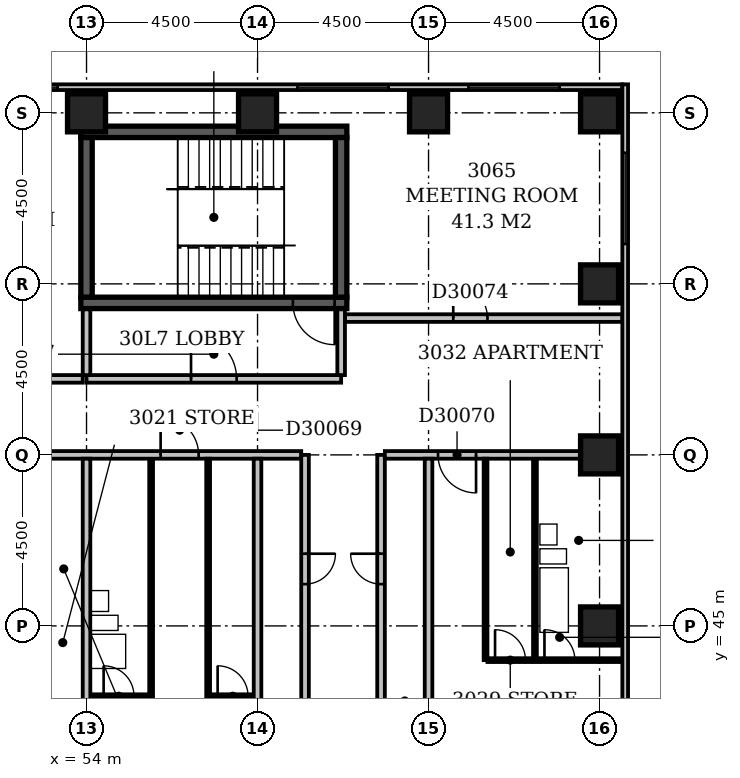
"""IFC4 building model, lengths in metres.
Left out: names, types, materials, properties, quantities, classifications, styles, units other than length and angle.
Written with IfcOpenShell. Run it as: python <this file> out.ifc"""

import sys

from ifc_helpers import new_model, si_unit, direction, frame, frame_2d, origin, origin_2d, place, context, subcontext, project, spatial, rectangle, extrude, element, fill, save


model = new_model("IFC4")
c1 = context("Model", 3, precision=1e-05, world=origin(), true_north=direction((0.0, 1.0)))
c2 = subcontext(c1, "Body", "Model", "MODEL_VIEW")
j1 = project(units=[si_unit("LENGTHUNIT", "METRE"), si_unit("PLANEANGLEUNIT", "RADIAN")], contexts=[c1])
p1 = place(None, origin())
s1 = spatial("IfcSite", under=j1, at=p1, CompositionType="ELEMENT")
p2 = place(p1, origin())
s2 = spatial("IfcBuilding", under=s1, at=p2, CompositionType="ELEMENT")
p3 = place(p2, frame((0.0, 0.0, 123.2)))
s3 = spatial("IfcBuildingStorey", under=s2, at=p3, CompositionType="ELEMENT", Elevation=123.2)
p4 = place(p3, frame((53.85, 53.5, -0.3), z_axis=(0.0, 0.0, 1.0), x_axis=(1.0, 0.0, 0.0)))
e1 = element("IfcWall", 1, at=p4, inside=s3, PredefinedType="SHEAR", context=c2, shape_type="SweptSolid", body=[
    extrude(rectangle(XDim=7.0, YDim=0.3, at=frame_2d((3.5, 0.0))), origin(), (0.0, 0.0, 1.0), 3.6),
])
p5 = place(p4, frame((5.58, 0.0, 0.3)))
e2 = element("IfcOpeningElement", 2, at=p5, cuts=e1, PredefinedType="OPENING", context=c2, shape_type="SweptSolid", body=[
    extrude(rectangle(XDim=1.1, YDim=2.1, at=frame_2d((0.55, 1.05))), frame((0.0, 0.162, 0.0), z_axis=(0.0, -1.0, 0.0), x_axis=(1.0, 0.0, 0.0)), (0.0, 0.0, 1.0), 0.324),
])
p6 = place(p3, frame((53.85, 58.0, -0.3), z_axis=(0.0, 0.0, 1.0), x_axis=(1.0, 0.0, 0.0)))
e3 = element("IfcWall", 3, at=p6, inside=s3, PredefinedType="SHEAR", context=c2, shape_type="SweptSolid", body=[
    extrude(rectangle(XDim=7.0, YDim=0.3, at=frame_2d((3.5, 0.0))), origin(), (0.0, 0.0, 1.0), 3.6),
])
for number, where, z_axis, x_axis in (
    (4, (54.0, 53.65, -0.3), (0.0, 0.0, 1.0), (0.0, 1.0, 0.0)),
    (5, (60.7, 53.65, -0.3), (0.0, 0.0, 1.0), (0.0, 1.0, 0.0)),
):
    element("IfcWall", number, at=place(p3, frame(where, z_axis=z_axis, x_axis=x_axis)), inside=s3, PredefinedType="SHEAR", context=c2, shape_type="SweptSolid", body=[
        extrude(rectangle(XDim=4.2, YDim=0.3, at=frame_2d((2.1, 0.0))), origin(), (0.0, 0.0, 1.0), 3.6),
    ])
for number, where, z_axis, x_axis in (
    (6, (67.5, 45.0, -0.3), (0.0, 0.0, 1.0), (1.0, 0.0, 0.0)),
    (7, (67.5, 49.5, -0.3), (0.0, 0.0, 1.0), (1.0, 0.0, 0.0)),
    (8, (67.5, 54.0, -0.3), (0.0, 0.0, 1.0), (1.0, 0.0, 0.0)),
    (9, (54.0, 58.5, -0.3), (0.0, 0.0, 1.0), (1.0, 0.0, 0.0)),
    (10, (58.5, 58.5, -0.3), (0.0, 0.0, 1.0), (1.0, 0.0, 0.0)),
    (11, (63.0, 58.5, -0.3), (0.0, 0.0, 1.0), (1.0, 0.0, 0.0)),
    (12, (67.5, 58.5, -0.3), (0.0, 0.0, 1.0), (1.0, 0.0, 0.0)),
):
    element("IfcColumn", number, at=place(p3, frame(where, z_axis=z_axis, x_axis=x_axis)), inside=s3, PredefinedType="COLUMN", context=c2, shape_type="SweptSolid", body=[
        extrude(rectangle(XDim=1.0, YDim=1.0, at=origin_2d()), origin(), (0.0, 0.0, 1.0), 3.6),
    ])
p7 = place(p3, frame((68.175, 35.4, 0.0), z_axis=(0.0, 0.0, 1.0), x_axis=(0.0, 1.0, 0.0)))
e13 = element("IfcWall", 13, at=p7, inside=s3, PredefinedType="STANDARD", context=c2, shape_type="SweptSolid", body=[
    extrude(rectangle(XDim=23.85, YDim=0.15, at=frame_2d((11.925, 0.0))), origin(), (0.0, 0.0, 1.0), 2.7),
])
p8 = place(p7, frame((1.65, 0.0, 0.6)))
e14 = element("IfcOpeningElement", 14, at=p8, cuts=e13, PredefinedType="OPENING", context=c2, shape_type="SweptSolid", body=[
    extrude(rectangle(XDim=2.4, YDim=1.8, at=frame_2d((1.2, 0.9))), frame((0.0, 0.087, 0.0), z_axis=(0.0, -1.0, 0.0), x_axis=(1.0, 0.0, 0.0)), (0.0, 0.0, 1.0), 0.174),
])
p9 = place(p7, frame((19.65, 0.0, 0.6)))
e15 = element("IfcOpeningElement", 15, at=p9, cuts=e13, PredefinedType="OPENING", context=c2, shape_type="SweptSolid", body=[
    extrude(rectangle(XDim=2.4, YDim=1.8, at=frame_2d((1.2, 0.9))), frame((0.0, 0.087, 0.0), z_axis=(0.0, -1.0, 0.0), x_axis=(1.0, 0.0, 0.0)), (0.0, 0.0, 1.0), 0.174),
])
p10 = place(p3, frame((68.1, 59.175, 0.0), z_axis=(0.0, 0.0, 1.0), x_axis=(-1.0, 0.0, 0.0)))
e16 = element("IfcWall", 16, at=p10, inside=s3, PredefinedType="STANDARD", context=c2, shape_type="SweptSolid", body=[
    extrude(rectangle(XDim=68.85, YDim=0.15, at=frame_2d((34.425, 0.0))), origin(), (0.0, 0.0, 1.0), 2.7),
])
p11 = place(p10, frame((1.65, 0.0, 0.6)))
e17 = element("IfcOpeningElement", 17, at=p11, cuts=e16, PredefinedType="OPENING", context=c2, shape_type="SweptSolid", body=[
    extrude(rectangle(XDim=2.4, YDim=1.8, at=frame_2d((1.2, 0.9))), frame((0.0, 0.087, 0.0), z_axis=(0.0, -1.0, 0.0), x_axis=(1.0, 0.0, 0.0)), (0.0, 0.0, 1.0), 0.174),
])
p12 = place(p10, frame((6.15, 0.0, 0.6)))
e18 = element("IfcOpeningElement", 18, at=p12, cuts=e16, PredefinedType="OPENING", context=c2, shape_type="SweptSolid", body=[
    extrude(rectangle(XDim=2.4, YDim=1.8, at=frame_2d((1.2, 0.9))), frame((0.0, 0.087, 0.0), z_axis=(0.0, -1.0, 0.0), x_axis=(1.0, 0.0, 0.0)), (0.0, 0.0, 1.0), 0.174),
])
p13 = place(p10, frame((14.86, 0.0, 0.6)))
e19 = element("IfcOpeningElement", 19, at=p13, cuts=e16, PredefinedType="OPENING", context=c2, shape_type="SweptSolid", body=[
    extrude(rectangle(XDim=1.8, YDim=1.8, at=frame_2d((0.9, 0.9))), frame((0.0, 0.087, 0.0), z_axis=(0.0, -1.0, 0.0), x_axis=(1.0, 0.0, 0.0)), (0.0, 0.0, 1.0), 0.174),
])
p14 = place(p10, frame((19.65, 0.0, 0.6)))
e20 = element("IfcOpeningElement", 20, at=p14, cuts=e16, PredefinedType="OPENING", context=c2, shape_type="SweptSolid", body=[
    extrude(rectangle(XDim=2.4, YDim=1.8, at=frame_2d((1.2, 0.9))), frame((0.0, 0.087, 0.0), z_axis=(0.0, -1.0, 0.0), x_axis=(1.0, 0.0, 0.0)), (0.0, 0.0, 1.0), 0.174),
])
p15 = place(p10, frame((38.54, 0.0, 0.6)))
e21 = element("IfcOpeningElement", 21, at=p15, cuts=e16, PredefinedType="OPENING", context=c2, shape_type="SweptSolid", body=[
    extrude(rectangle(XDim=1.8, YDim=1.8, at=frame_2d((0.9, 0.9))), frame((0.0, 0.087, 0.0), z_axis=(0.0, -1.0, 0.0), x_axis=(1.0, 0.0, 0.0)), (0.0, 0.0, 1.0), 0.174),
])
p16 = place(p3, frame((54.0, 51.5, 0.0), z_axis=(0.0, 0.0, 1.0), x_axis=(1.0, 0.0, 0.0)))
e22 = element("IfcWall", 22, at=p16, inside=s3, PredefinedType="PARTITIONING", context=c2, shape_type="SweptSolid", body=[
    extrude(rectangle(XDim=6.7, YDim=0.2, at=frame_2d((3.35, 0.0))), origin(), (0.0, 0.0, 1.0), 3.3),
])
p17 = place(p16, frame((2.75, 0.0, 0.0)))
e23 = element("IfcOpeningElement", 23, at=p17, cuts=e22, PredefinedType="OPENING", context=c2, shape_type="SweptSolid", body=[
    extrude(rectangle(XDim=1.2, YDim=2.1, at=frame_2d((0.6, 1.05))), frame((0.0, 0.112, 0.0), z_axis=(0.0, -1.0, 0.0), x_axis=(1.0, 0.0, 0.0)), (0.0, 0.0, 1.0), 0.224),
])
p18 = place(p3, frame((60.7, 51.6, 0.0), z_axis=(0.0, 0.0, 1.0), x_axis=(0.0, 1.0, 0.0)))
e24 = element("IfcWall", 24, at=p18, inside=s3, PredefinedType="PARTITIONING", context=c2, shape_type="SweptSolid", body=[
    extrude(rectangle(XDim=1.73, YDim=0.2, at=frame_2d((0.865, 0.0))), origin(), (0.0, 0.0, 1.0), 3.3),
])
p19 = place(p3, frame((54.0, 51.6, 0.0), z_axis=(0.0, 0.0, 1.0), x_axis=(0.0, 1.0, 0.0)))
e25 = element("IfcWall", 25, at=p19, inside=s3, PredefinedType="PARTITIONING", context=c2, shape_type="SweptSolid", body=[
    extrude(rectangle(XDim=1.73, YDim=0.2, at=frame_2d((0.865, 0.0))), origin(), (0.0, 0.0, 1.0), 2.6),
])
p20 = place(p3, frame((54.0, 36.5, 0.0), z_axis=(0.0, 0.0, 1.0), x_axis=(0.0, 1.0, 0.0)))
e26 = element("IfcWall", 26, at=p20, inside=s3, PredefinedType="PARTITIONING", context=c2, shape_type="SweptSolid", body=[
    extrude(rectangle(XDim=12.9, YDim=0.2, at=frame_2d((6.45, 0.0))), origin(), (0.0, 0.0, 1.0), 2.6),
])
p21 = place(p3, frame((58.5, 36.5, 0.0), z_axis=(0.0, 0.0, 1.0), x_axis=(0.0, 1.0, 0.0)))
e27 = element("IfcWall", 27, at=p21, inside=s3, PredefinedType="PARTITIONING", context=c2, shape_type="SweptSolid", body=[
    extrude(rectangle(XDim=12.9, YDim=0.2, at=frame_2d((6.45, 0.0))), origin(), (0.0, 0.0, 1.0), 3.3),
])
p22 = place(p3, frame((63.0, 36.5, 0.0), z_axis=(0.0, 0.0, 1.0), x_axis=(0.0, 1.0, 0.0)))
e28 = element("IfcWall", 28, at=p22, inside=s3, PredefinedType="PARTITIONING", context=c2, shape_type="SweptSolid", body=[
    extrude(rectangle(XDim=12.9, YDim=0.2, at=frame_2d((6.45, 0.0))), origin(), (0.0, 0.0, 1.0), 2.4),
])
p23 = place(p3, frame((59.75, 40.55, 0.0), z_axis=(0.0, 0.0, 1.0), x_axis=(0.0, 1.0, 0.0)))
e29 = element("IfcWall", 29, at=p23, inside=s3, PredefinedType="PARTITIONING", context=c2, shape_type="SweptSolid", body=[
    extrude(rectangle(XDim=8.95, YDim=0.2, at=frame_2d((4.475, 0.0))), origin(), (0.0, 0.0, 1.0), 3.3),
])
p24 = place(p23, frame((5.55, 0.0, 0.0)))
e30 = element("IfcOpeningElement", 30, at=p24, cuts=e29, PredefinedType="OPENING", context=c2, shape_type="SweptSolid", body=[
    extrude(rectangle(XDim=0.8, YDim=2.1, at=frame_2d((0.4, 1.05))), frame((0.0, 0.112, 0.0), z_axis=(0.0, -1.0, 0.0), x_axis=(1.0, 0.0, 0.0)), (0.0, 0.0, 1.0), 0.224),
])
p25 = place(p3, frame((61.75, 40.55, 0.0), z_axis=(0.0, 0.0, 1.0), x_axis=(0.0, 1.0, 0.0)))
e31 = element("IfcWall", 31, at=p25, inside=s3, PredefinedType="PARTITIONING", context=c2, shape_type="SweptSolid", body=[
    extrude(rectangle(XDim=8.95, YDim=0.2, at=frame_2d((4.475, 0.0))), origin(), (0.0, 0.0, 1.0), 3.3),
])
p26 = place(p25, frame((5.55, 0.0, 0.0)))
e32 = element("IfcOpeningElement", 32, at=p26, cuts=e31, PredefinedType="OPENING", context=c2, shape_type="SweptSolid", body=[
    extrude(rectangle(XDim=0.8, YDim=2.1, at=frame_2d((0.4, 1.05))), frame((0.0, 0.112, 0.0), z_axis=(0.0, -1.0, 0.0), x_axis=(1.0, 0.0, 0.0)), (0.0, 0.0, 1.0), 0.224),
])
p27 = place(p3, frame((54.1, 43.15, 0.0), z_axis=(0.0, 0.0, 1.0), x_axis=(1.0, 0.0, 0.0)))
e33 = element("IfcWall", 33, at=p27, inside=s3, PredefinedType="PARTITIONING", context=c2, shape_type="SweptSolid", body=[
    extrude(rectangle(XDim=1.55, YDim=0.1, at=frame_2d((0.775, 0.0))), origin(), (0.0, 0.0, 1.0), 3.3),
])
p28 = place(p27, frame((0.35, 0.0, 0.0)))
e34 = element("IfcOpeningElement", 34, at=p28, cuts=e33, PredefinedType="OPENING", context=c2, shape_type="SweptSolid", body=[
    extrude(rectangle(XDim=0.8, YDim=2.1, at=frame_2d((0.4, 1.05))), frame((0.0, 0.062, 0.0), z_axis=(0.0, -1.0, 0.0), x_axis=(1.0, 0.0, 0.0)), (0.0, 0.0, 1.0), 0.124),
])
p29 = place(p3, frame((55.7, 43.15, 0.0), z_axis=(0.0, 0.0, 1.0), x_axis=(0.0, 1.0, 0.0)))
e35 = element("IfcWall", 35, at=p29, inside=s3, PredefinedType="PLUMBINGWALL", context=c2, shape_type="SweptSolid", body=[
    extrude(rectangle(XDim=6.25, YDim=0.1, at=frame_2d((3.125, 0.0))), origin(), (0.0, 0.0, 1.0), 3.3),
])
p30 = place(p3, frame((57.2, 43.15, 0.0), z_axis=(0.0, 0.0, 1.0), x_axis=(0.0, 1.0, 0.0)))
e36 = element("IfcWall", 36, at=p30, inside=s3, PredefinedType="PARTITIONING", context=c2, shape_type="SweptSolid", body=[
    extrude(rectangle(XDim=6.25, YDim=0.1, at=frame_2d((3.125, 0.0))), origin(), (0.0, 0.0, 1.0), 3.3),
])
p31 = place(p3, frame((57.25, 43.15, 0.0), z_axis=(0.0, 0.0, 1.0), x_axis=(1.0, 0.0, 0.0)))
e37 = element("IfcWall", 37, at=p31, inside=s3, PredefinedType="PARTITIONING", context=c2, shape_type="SweptSolid", body=[
    extrude(rectangle(XDim=1.15, YDim=0.1, at=frame_2d((0.575, 0.0))), origin(), (0.0, 0.0, 1.0), 3.3),
])
p32 = place(p31, frame((0.2, 0.0, 0.0)))
e38 = element("IfcOpeningElement", 38, at=p32, cuts=e37, PredefinedType="OPENING", context=c2, shape_type="SweptSolid", body=[
    extrude(rectangle(XDim=0.8, YDim=2.1, at=frame_2d((0.4, 1.05))), frame((0.0, 0.062, 0.0), z_axis=(0.0, -1.0, 0.0), x_axis=(1.0, 0.0, 0.0)), (0.0, 0.0, 1.0), 0.124),
])
p33 = place(p3, frame((64.5, 44.1, 0.0), z_axis=(0.0, 0.0, 1.0), x_axis=(0.0, 1.0, 0.0)))
e39 = element("IfcWall", 39, at=p33, inside=s3, PredefinedType="PARTITIONING", context=c2, shape_type="SweptSolid", body=[
    extrude(rectangle(XDim=5.3, YDim=0.1, at=frame_2d((2.65, 0.0))), origin(), (0.0, 0.0, 1.0), 3.3),
])
p34 = place(p3, frame((64.55, 44.1, 0.0), z_axis=(0.0, 0.0, 1.0), x_axis=(1.0, 0.0, 0.0)))
e40 = element("IfcWall", 40, at=p34, inside=s3, PredefinedType="PARTITIONING", context=c2, shape_type="SweptSolid", body=[
    extrude(rectangle(XDim=3.55, YDim=0.1, at=frame_2d((1.775, 0.0))), origin(), (0.0, 0.0, 1.0), 3.3),
])
p35 = place(p34, frame((1.5, 0.0, 0.0)))
e41 = element("IfcOpeningElement", 41, at=p35, cuts=e40, PredefinedType="OPENING", context=c2, shape_type="SweptSolid", body=[
    extrude(rectangle(XDim=0.8, YDim=2.1, at=frame_2d((0.4, 1.05))), frame((0.0, 0.062, 0.0), z_axis=(0.0, -1.0, 0.0), x_axis=(1.0, 0.0, 0.0)), (0.0, 0.0, 1.0), 0.124),
])
p36 = place(p34, frame((0.2, 0.0, 0.0)))
e42 = element("IfcOpeningElement", 42, at=p36, cuts=e40, PredefinedType="OPENING", context=c2, shape_type="SweptSolid", body=[
    extrude(rectangle(XDim=0.8, YDim=2.1, at=frame_2d((0.4, 1.05))), frame((0.0, 0.062, 0.0), z_axis=(0.0, -1.0, 0.0), x_axis=(1.0, 0.0, 0.0)), (0.0, 0.0, 1.0), 0.124),
])
p37 = place(p3, frame((65.8, 44.15, 0.0), z_axis=(0.0, 0.0, 1.0), x_axis=(0.0, 1.0, 0.0)))
e43 = element("IfcWall", 43, at=p37, inside=s3, PredefinedType="PLUMBINGWALL", context=c2, shape_type="SweptSolid", body=[
    extrude(rectangle(XDim=5.25, YDim=0.1, at=frame_2d((2.625, 0.0))), origin(), (0.0, 0.0, 1.0), 3.3),
])
p38 = place(p3, frame((52.85, 49.5, 0.0), z_axis=(0.0, 0.0, 1.0), x_axis=(1.0, 0.0, 0.0)))
e44 = element("IfcWall", 44, at=p38, inside=s3, PredefinedType="PARTITIONING", context=c2, shape_type="SweptSolid", body=[
    extrude(rectangle(XDim=6.8, YDim=0.2, at=frame_2d((3.4, 0.0))), origin(), (0.0, 0.0, 1.0), 3.3),
])
p39 = place(p38, frame((3.1, 0.0, 0.0)))
e45 = element("IfcOpeningElement", 45, at=p39, cuts=e44, PredefinedType="OPENING", context=c2, shape_type="SweptSolid", body=[
    extrude(rectangle(XDim=1.0, YDim=2.1, at=frame_2d((0.5, 1.05))), frame((0.0, 0.112, 0.0), z_axis=(0.0, -1.0, 0.0), x_axis=(1.0, 0.0, 0.0)), (0.0, 0.0, 1.0), 0.224),
])
p40 = place(p3, frame((61.85, 49.5, 0.0), z_axis=(0.0, 0.0, 1.0), x_axis=(1.0, 0.0, 0.0)))
e46 = element("IfcWall", 46, at=p40, inside=s3, PredefinedType="PARTITIONING", context=c2, shape_type="SweptSolid", body=[
    extrude(rectangle(XDim=5.15, YDim=0.2, at=frame_2d((2.575, 0.0))), origin(), (0.0, 0.0, 1.0), 3.3),
])
p41 = place(p40, frame((1.4, 0.0, 0.0)))
e47 = element("IfcOpeningElement", 47, at=p41, cuts=e46, PredefinedType="OPENING", context=c2, shape_type="SweptSolid", body=[
    extrude(rectangle(XDim=1.0, YDim=2.1, at=frame_2d((0.5, 1.05))), frame((0.0, 0.112, 0.0), z_axis=(0.0, -1.0, 0.0), x_axis=(1.0, 0.0, 0.0)), (0.0, 0.0, 1.0), 0.224),
])
p42 = place(p3, frame((44.1, 51.5, 0.0), z_axis=(0.0, 0.0, 1.0), x_axis=(1.0, 0.0, 0.0)))
e48 = element("IfcWall", 48, at=p42, inside=s3, PredefinedType="PARTITIONING", context=c2, shape_type="SweptSolid", body=[
    extrude(rectangle(XDim=9.8, YDim=0.2, at=frame_2d((4.9, 0.0))), origin(), (0.0, 0.0, 1.0), 3.3),
])
p43 = place(p42, frame((4.45, 0.0, 0.0)))
e49 = element("IfcOpeningElement", 49, at=p43, cuts=e48, PredefinedType="OPENING", context=c2, shape_type="SweptSolid", body=[
    extrude(rectangle(XDim=0.9, YDim=2.1, at=frame_2d((0.45, 1.05))), frame((0.0, 0.112, 0.0), z_axis=(0.0, -1.0, 0.0), x_axis=(1.0, 0.0, 0.0)), (0.0, 0.0, 1.0), 0.224),
])
p44 = place(p3, frame((60.8, 53.1, 0.0), z_axis=(0.0, 0.0, 1.0), x_axis=(1.0, 0.0, 0.0)))
e50 = element("IfcWall", 50, at=p44, inside=s3, PredefinedType="PARTITIONING", context=c2, shape_type="SweptSolid", body=[
    extrude(rectangle(XDim=7.3, YDim=0.2, at=frame_2d((3.65, 0.0))), origin(), (0.0, 0.0, 1.0), 3.3),
])
p45 = place(p44, frame((2.85, 0.0, 0.0)))
e51 = element("IfcOpeningElement", 51, at=p45, cuts=e50, PredefinedType="OPENING", context=c2, shape_type="SweptSolid", body=[
    extrude(rectangle(XDim=0.9, YDim=2.1, at=frame_2d((0.45, 1.05))), frame((0.0, 0.112, 0.0), z_axis=(0.0, -1.0, 0.0), x_axis=(1.0, 0.0, 0.0)), (0.0, 0.0, 1.0), 0.224),
])
p46 = place(p9, origin())
e52 = element("IfcWindow", 52, at=p46, inside=s3, PartitioningType="SINGLE_PANEL", PredefinedType="WINDOW", context=c2, shape_type="SweptSolid", body=[
    extrude(rectangle(XDim=2.4, YDim=1.8, at=frame_2d((1.2, 0.9))), frame((0.0, 0.03, 0.0), z_axis=(0.0, -1.0, 0.0), x_axis=(1.0, 0.0, 0.0)), (0.0, 0.0, 1.0), 0.06),
])
fill(e15, e52)
p47 = place(p11, origin())
e53 = element("IfcWindow", 53, at=p47, inside=s3, PartitioningType="SINGLE_PANEL", PredefinedType="WINDOW", context=c2, shape_type="SweptSolid", body=[
    extrude(rectangle(XDim=2.4, YDim=1.8, at=frame_2d((1.2, 0.9))), frame((0.0, 0.03, 0.0), z_axis=(0.0, -1.0, 0.0), x_axis=(1.0, 0.0, 0.0)), (0.0, 0.0, 1.0), 0.06),
])
fill(e17, e53)
p48 = place(p12, origin())
e54 = element("IfcWindow", 54, at=p48, inside=s3, PartitioningType="SINGLE_PANEL", PredefinedType="WINDOW", context=c2, shape_type="SweptSolid", body=[
    extrude(rectangle(XDim=2.4, YDim=1.8, at=frame_2d((1.2, 0.9))), frame((0.0, 0.03, 0.0), z_axis=(0.0, -1.0, 0.0), x_axis=(1.0, 0.0, 0.0)), (0.0, 0.0, 1.0), 0.06),
])
fill(e18, e54)
p49 = place(p13, origin())
e55 = element("IfcWindow", 55, at=p49, inside=s3, PartitioningType="SINGLE_PANEL", PredefinedType="WINDOW", context=c2, shape_type="SweptSolid", body=[
    extrude(rectangle(XDim=1.8, YDim=1.8, at=frame_2d((0.9, 0.9))), frame((0.0, 0.03, 0.0), z_axis=(0.0, -1.0, 0.0), x_axis=(1.0, 0.0, 0.0)), (0.0, 0.0, 1.0), 0.06),
])
fill(e19, e55)
p50 = place(p17, origin())
e56 = element("IfcDoor", 56, at=p50, inside=s3, OperationType="SINGLE_SWING_LEFT", PredefinedType="DOOR", context=c2, shape_type="SweptSolid", body=[
    extrude(rectangle(XDim=1.2, YDim=2.1, at=frame_2d((0.6, 1.05))), frame((0.0, 0.025, 0.0), z_axis=(0.0, -1.0, 0.0), x_axis=(1.0, 0.0, 0.0)), (0.0, 0.0, 1.0), 0.05),
])
fill(e23, e56)
p51 = place(p5, origin())
e57 = element("IfcDoor", 57, at=p51, inside=s3, OperationType="SINGLE_SWING_RIGHT", PredefinedType="DOOR", context=c2, shape_type="SweptSolid", body=[
    extrude(rectangle(XDim=1.1, YDim=2.1, at=frame_2d((0.55, 1.05))), frame((0.0, 0.025, 0.0), z_axis=(0.0, -1.0, 0.0), x_axis=(1.0, 0.0, 0.0)), (0.0, 0.0, 1.0), 0.05),
])
fill(e2, e57)
p52 = place(p24, origin())
e58 = element("IfcDoor", 58, at=p52, inside=s3, OperationType="SINGLE_SWING_RIGHT", PredefinedType="DOOR", context=c2, shape_type="SweptSolid", body=[
    extrude(rectangle(XDim=0.8, YDim=2.1, at=frame_2d((0.4, 1.05))), frame((0.0, 0.025, 0.0), z_axis=(0.0, -1.0, 0.0), x_axis=(1.0, 0.0, 0.0)), (0.0, 0.0, 1.0), 0.05),
])
fill(e30, e58)
p53 = place(p26, frame((0.8, 0.0, 0.0), z_axis=(0.0, 0.0, 1.0), x_axis=(-1.0, 0.0, 0.0)))
e59 = element("IfcDoor", 59, at=p53, inside=s3, OperationType="SINGLE_SWING_LEFT", PredefinedType="DOOR", context=c2, shape_type="SweptSolid", body=[
    extrude(rectangle(XDim=0.8, YDim=2.1, at=frame_2d((0.4, 1.05))), frame((0.0, 0.025, 0.0), z_axis=(0.0, -1.0, 0.0), x_axis=(1.0, 0.0, 0.0)), (0.0, 0.0, 1.0), 0.05),
])
fill(e32, e59)
p54 = place(p28, origin())
e60 = element("IfcDoor", 60, at=p54, inside=s3, OperationType="SINGLE_SWING_LEFT", PredefinedType="DOOR", context=c2, shape_type="SweptSolid", body=[
    extrude(rectangle(XDim=0.8, YDim=2.1, at=frame_2d((0.4, 1.05))), frame((0.0, 0.025, 0.0), z_axis=(0.0, -1.0, 0.0), x_axis=(1.0, 0.0, 0.0)), (0.0, 0.0, 1.0), 0.05),
])
fill(e34, e60)
p55 = place(p32, origin())
e61 = element("IfcDoor", 61, at=p55, inside=s3, OperationType="SINGLE_SWING_LEFT", PredefinedType="DOOR", context=c2, shape_type="SweptSolid", body=[
    extrude(rectangle(XDim=0.8, YDim=2.1, at=frame_2d((0.4, 1.05))), frame((0.0, 0.025, 0.0), z_axis=(0.0, -1.0, 0.0), x_axis=(1.0, 0.0, 0.0)), (0.0, 0.0, 1.0), 0.05),
])
fill(e38, e61)
p56 = place(p35, origin())
e62 = element("IfcDoor", 62, at=p56, inside=s3, OperationType="SINGLE_SWING_LEFT", PredefinedType="DOOR", context=c2, shape_type="SweptSolid", body=[
    extrude(rectangle(XDim=0.8, YDim=2.1, at=frame_2d((0.4, 1.05))), frame((0.0, 0.025, 0.0), z_axis=(0.0, -1.0, 0.0), x_axis=(1.0, 0.0, 0.0)), (0.0, 0.0, 1.0), 0.05),
])
fill(e41, e62)
p57 = place(p36, origin())
e63 = element("IfcDoor", 63, at=p57, inside=s3, OperationType="SINGLE_SWING_LEFT", PredefinedType="DOOR", context=c2, shape_type="SweptSolid", body=[
    extrude(rectangle(XDim=0.8, YDim=2.1, at=frame_2d((0.4, 1.05))), frame((0.0, 0.025, 0.0), z_axis=(0.0, -1.0, 0.0), x_axis=(1.0, 0.0, 0.0)), (0.0, 0.0, 1.0), 0.05),
])
fill(e42, e63)
p58 = place(p39, origin())
e64 = element("IfcDoor", 64, at=p58, inside=s3, OperationType="SINGLE_SWING_LEFT", PredefinedType="DOOR", context=c2, shape_type="SweptSolid", body=[
    extrude(rectangle(XDim=1.0, YDim=2.1, at=frame_2d((0.5, 1.05))), frame((0.0, 0.025, 0.0), z_axis=(0.0, -1.0, 0.0), x_axis=(1.0, 0.0, 0.0)), (0.0, 0.0, 1.0), 0.05),
])
fill(e45, e64)
p59 = place(p41, origin())
e65 = element("IfcDoor", 65, at=p59, inside=s3, OperationType="SINGLE_SWING_RIGHT", PredefinedType="DOOR", context=c2, shape_type="SweptSolid", body=[
    extrude(rectangle(XDim=1.0, YDim=2.1, at=frame_2d((0.5, 1.05))), frame((0.0, 0.025, 0.0), z_axis=(0.0, -1.0, 0.0), x_axis=(1.0, 0.0, 0.0)), (0.0, 0.0, 1.0), 0.05),
])
fill(e47, e65)
p60 = place(p45, origin())
e66 = element("IfcDoor", 66, at=p60, inside=s3, OperationType="SINGLE_SWING_LEFT", PredefinedType="DOOR", context=c2, shape_type="SweptSolid", body=[
    extrude(rectangle(XDim=0.9, YDim=2.1, at=frame_2d((0.45, 1.05))), frame((0.0, 0.025, 0.0), z_axis=(0.0, -1.0, 0.0), x_axis=(1.0, 0.0, 0.0)), (0.0, 0.0, 1.0), 0.05),
])
fill(e51, e66)
save(model, sys.argv[1])
